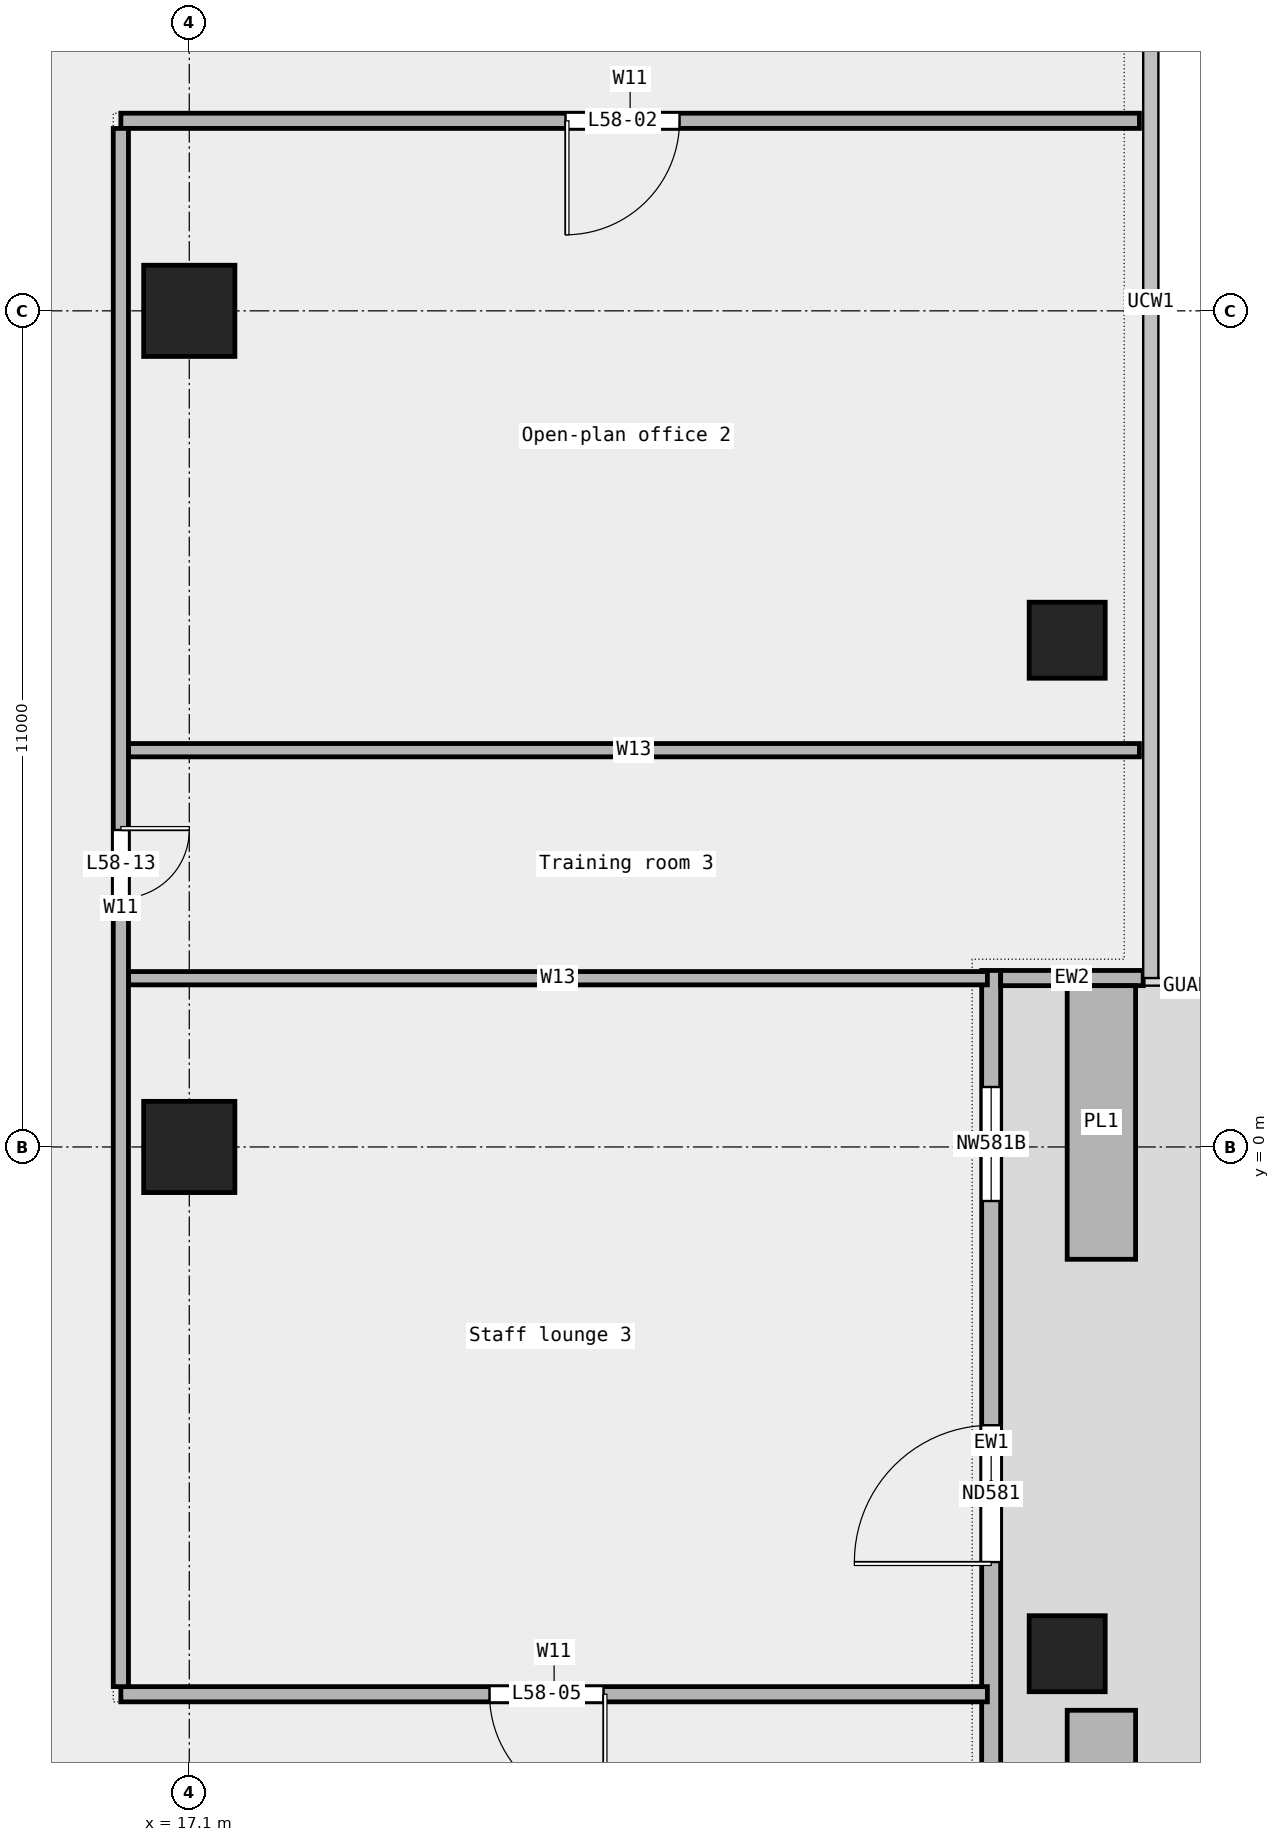
"""IFC4 building model, lengths in metres.
Left out: names, types, materials, properties, quantities, classifications, styles, units other than length and angle.
Written with IfcOpenShell. Run it as: python <this file> out.ifc"""

import sys

from ifc_helpers import new_model, si_unit, direction, frame, frame_2d, origin, origin_2d, place, context, subcontext, project, spatial, rectangle, extrude, element, fill, save


model = new_model("IFC4")
c1 = context("Model", 3, precision=1e-05, world=origin(), true_north=direction((0.0, 1.0)))
c2 = subcontext(c1, "Body", "Model", "MODEL_VIEW")
j1 = project(units=[si_unit("LENGTHUNIT", "METRE"), si_unit("PLANEANGLEUNIT", "RADIAN")], contexts=[c1])
p1 = place(None, origin())
s1 = spatial("IfcSite", under=j1, at=p1, CompositionType="ELEMENT")
p2 = place(p1, origin())
s2 = spatial("IfcBuilding", under=s1, at=p2, CompositionType="ELEMENT")
p3 = place(p2, frame((0.0, 0.0, 271.4)))
s3 = spatial("IfcBuildingStorey", under=s2, at=p3, CompositionType="ELEMENT", Elevation=271.4)
for number, where, z_axis, x_axis in (
    (1, (28.65, -6.667, 0.0), (0.0, 0.0, 1.0), (1.0, 0.0, 0.0)),
    (2, (28.65, 6.667, 0.0), (0.0, 0.0, 1.0), (1.0, 0.0, 0.0)),
):
    element("IfcColumn", number, at=place(p3, frame(where, z_axis=z_axis, x_axis=x_axis)), inside=s3, PredefinedType="COLUMN", context=c2, shape_type="SweptSolid", body=[
        extrude(rectangle(XDim=1.0, YDim=1.0, at=origin_2d()), origin(), (0.0, 0.0, 1.0), 3.6),
    ])
for number, where, z_axis, x_axis in (
    (3, (17.1, 0.0, 0.0), (0.0, 0.0, 1.0), (1.0, 0.0, 0.0)),
    (4, (17.1, 11.0, 0.0), (0.0, 0.0, 1.0), (1.0, 0.0, 0.0)),
):
    element("IfcColumn", number, at=place(p3, frame(where, z_axis=z_axis, x_axis=x_axis)), inside=s3, PredefinedType="COLUMN", context=c2, shape_type="SweptSolid", body=[
        extrude(rectangle(XDim=1.2, YDim=1.2, at=origin_2d()), origin(), (0.0, 0.0, 1.0), 3.6),
    ])
p4 = place(p3, frame((27.65, -11.211, 0.0), z_axis=(0.0, 0.0, 1.0), x_axis=(0.0, 1.0, 0.0)))
e5 = element("IfcWall", 5, at=p4, inside=s3, PredefinedType="STANDARD", context=c2, shape_type="SweptSolid", body=[
    extrude(rectangle(XDim=13.533, YDim=0.25, at=frame_2d((6.767, 0.0))), origin(), (0.0, 0.0, 1.0), 3.6),
])
p5 = place(p4, frame((1.5, 0.0, 0.45)))
e6 = element("IfcOpeningElement", 6, at=p5, cuts=e5, PredefinedType="OPENING", context=c2, shape_type="SweptSolid", body=[
    extrude(rectangle(XDim=1.5, YDim=2.4, at=frame_2d((0.75, 1.2))), frame((0.0, 0.137, 0.0), z_axis=(0.0, -1.0, 0.0), x_axis=(1.0, 0.0, 0.0)), (0.0, 0.0, 1.0), 0.274),
])
p6 = place(p4, frame((5.75, 0.0, 0.0)))
e7 = element("IfcOpeningElement", 7, at=p6, cuts=e5, PredefinedType="OPENING", context=c2, shape_type="SweptSolid", body=[
    extrude(rectangle(XDim=1.8, YDim=2.4, at=frame_2d((0.9, 1.2))), frame((0.0, 0.137, 0.0), z_axis=(0.0, -1.0, 0.0), x_axis=(1.0, 0.0, 0.0)), (0.0, 0.0, 1.0), 0.274),
])
p7 = place(p4, frame((10.5, 0.0, 0.45)))
e8 = element("IfcOpeningElement", 8, at=p7, cuts=e5, PredefinedType="OPENING", context=c2, shape_type="SweptSolid", body=[
    extrude(rectangle(XDim=1.5, YDim=2.4, at=frame_2d((0.75, 1.2))), frame((0.0, 0.137, 0.0), z_axis=(0.0, -1.0, 0.0), x_axis=(1.0, 0.0, 0.0)), (0.0, 0.0, 1.0), 0.274),
])
p8 = place(p3, frame((29.65, 2.222, 0.0), z_axis=(0.0, 0.0, 1.0), x_axis=(-1.0, 0.0, 0.0)))
e9 = element("IfcWall", 9, at=p8, inside=s3, PredefinedType="STANDARD", context=c2, shape_type="SweptSolid", body=[
    extrude(rectangle(XDim=1.875, YDim=0.2, at=frame_2d((0.938, 0.0))), origin(), (0.0, 0.0, 1.0), 3.6),
])
for number, where, z_axis, x_axis in (
    (10, (29.1, -11.011, 0.0), (0.0, 0.0, 1.0), (0.0, 1.0, 0.0)),
    (11, (29.1, -1.478, 0.0), (0.0, 0.0, 1.0), (0.0, 1.0, 0.0)),
):
    element("IfcWall", number, at=place(p3, frame(where, z_axis=z_axis, x_axis=x_axis)), inside=s3, PredefinedType="STANDARD", context=c2, shape_type="SweptSolid", body=[
        extrude(rectangle(XDim=3.6, YDim=0.9, at=frame_2d((1.8, 0.0))), origin(), (0.0, 0.0, 1.0), 0.7),
    ])
p9 = place(p3, frame((16.2, -7.2, 0.0), z_axis=(0.0, 0.0, 1.0), x_axis=(1.0, 0.0, 0.0)))
e12 = element("IfcWall", 12, at=p9, inside=s3, PredefinedType="PARTITIONING", context=c2, shape_type="SweptSolid", body=[
    extrude(rectangle(XDim=11.4, YDim=0.2, at=frame_2d((5.7, 0.0))), origin(), (0.0, 0.0, 1.0), 3.6),
])
p10 = place(p9, frame((4.85, 0.0, 0.0)))
e13 = element("IfcOpeningElement", 13, at=p10, cuts=e12, PredefinedType="OPENING", context=c2, shape_type="SweptSolid", body=[
    extrude(rectangle(XDim=1.5, YDim=2.1, at=frame_2d((0.75, 1.05))), frame((0.0, 0.112, 0.0), z_axis=(0.0, -1.0, 0.0), x_axis=(1.0, 0.0, 0.0)), (0.0, 0.0, 1.0), 0.224),
])
p11 = place(p3, frame((16.3, 2.22, 0.0), z_axis=(0.0, 0.0, 1.0), x_axis=(1.0, 0.0, 0.0)))
e14 = element("IfcWall", 14, at=p11, inside=s3, PredefinedType="PARTITIONING", context=c2, shape_type="SweptSolid", body=[
    extrude(rectangle(XDim=11.3, YDim=0.175, at=frame_2d((5.65, 0.0))), origin(), (0.0, 0.0, 1.0), 3.6),
])
p12 = place(p3, frame((16.3, 5.22, 0.0), z_axis=(0.0, 0.0, 1.0), x_axis=(1.0, 0.0, 0.0)))
e15 = element("IfcWall", 15, at=p12, inside=s3, PredefinedType="PARTITIONING", context=c2, shape_type="SweptSolid", body=[
    extrude(rectangle(XDim=13.3, YDim=0.175, at=frame_2d((6.65, 0.0))), origin(), (0.0, 0.0, 1.0), 3.6),
])
p13 = place(p3, frame((16.2, 13.5, 0.0), z_axis=(0.0, 0.0, 1.0), x_axis=(1.0, 0.0, 0.0)))
e16 = element("IfcWall", 16, at=p13, inside=s3, PredefinedType="PARTITIONING", context=c2, shape_type="SweptSolid", body=[
    extrude(rectangle(XDim=13.4, YDim=0.2, at=frame_2d((6.7, 0.0))), origin(), (0.0, 0.0, 1.0), 3.6),
])
p14 = place(p13, frame((5.85, 0.0, 0.0)))
e17 = element("IfcOpeningElement", 17, at=p14, cuts=e16, PredefinedType="OPENING", context=c2, shape_type="SweptSolid", body=[
    extrude(rectangle(XDim=1.5, YDim=2.1, at=frame_2d((0.75, 1.05))), frame((0.0, 0.112, 0.0), z_axis=(0.0, -1.0, 0.0), x_axis=(1.0, 0.0, 0.0)), (0.0, 0.0, 1.0), 0.224),
])
p15 = place(p3, frame((16.2, -7.1, 0.0), z_axis=(0.0, 0.0, 1.0), x_axis=(0.0, 1.0, 0.0)))
e18 = element("IfcWall", 18, at=p15, inside=s3, PredefinedType="PARTITIONING", context=c2, shape_type="SweptSolid", body=[
    extrude(rectangle(XDim=20.5, YDim=0.2, at=frame_2d((10.25, 0.0))), origin(), (0.0, 0.0, 1.0), 3.6),
])
p16 = place(p15, frame((10.37, 0.0, 0.0)))
e19 = element("IfcOpeningElement", 19, at=p16, cuts=e18, PredefinedType="OPENING", context=c2, shape_type="SweptSolid", body=[
    extrude(rectangle(XDim=0.9, YDim=2.1, at=frame_2d((0.45, 1.05))), frame((0.0, 0.112, 0.0), z_axis=(0.0, -1.0, 0.0), x_axis=(1.0, 0.0, 0.0)), (0.0, 0.0, 1.0), 0.224),
])
p17 = place(p6, origin())
e20 = element("IfcDoor", 20, at=p17, inside=s3, OperationType="DOUBLE_DOOR_SINGLE_SWING", PredefinedType="DOOR", context=c2, shape_type="SweptSolid", body=[
    extrude(rectangle(XDim=1.8, YDim=2.4, at=frame_2d((0.9, 1.2))), frame((0.0, 0.025, 0.0), z_axis=(0.0, -1.0, 0.0), x_axis=(1.0, 0.0, 0.0)), (0.0, 0.0, 1.0), 0.05),
])
fill(e7, e20)
p18 = place(p7, origin())
e21 = element("IfcWindow", 21, at=p18, inside=s3, PartitioningType="SINGLE_PANEL", PredefinedType="WINDOW", context=c2, shape_type="SweptSolid", body=[
    extrude(rectangle(XDim=1.5, YDim=2.4, at=frame_2d((0.75, 1.2))), frame((0.0, 0.03, 0.0), z_axis=(0.0, -1.0, 0.0), x_axis=(1.0, 0.0, 0.0)), (0.0, 0.0, 1.0), 0.06),
])
fill(e8, e21)
p19 = place(p14, origin())
e22 = element("IfcDoor", 22, at=p19, inside=s3, OperationType="DOUBLE_DOOR_SINGLE_SWING", PredefinedType="DOOR", context=c2, shape_type="SweptSolid", body=[
    extrude(rectangle(XDim=1.5, YDim=2.1, at=frame_2d((0.75, 1.05))), frame((0.0, 0.025, 0.0), z_axis=(0.0, -1.0, 0.0), x_axis=(1.0, 0.0, 0.0)), (0.0, 0.0, 1.0), 0.05),
])
fill(e17, e22)
p20 = place(p10, origin())
e23 = element("IfcDoor", 23, at=p20, inside=s3, OperationType="DOUBLE_DOOR_SINGLE_SWING", PredefinedType="DOOR", context=c2, shape_type="SweptSolid", body=[
    extrude(rectangle(XDim=1.5, YDim=2.1, at=frame_2d((0.75, 1.05))), frame((0.0, 0.025, 0.0), z_axis=(0.0, -1.0, 0.0), x_axis=(1.0, 0.0, 0.0)), (0.0, 0.0, 1.0), 0.05),
])
fill(e13, e23)
p21 = place(p16, origin())
e24 = element("IfcDoor", 24, at=p21, inside=s3, OperationType="SINGLE_SWING_LEFT", PredefinedType="DOOR", context=c2, shape_type="SweptSolid", body=[
    extrude(rectangle(XDim=0.9, YDim=2.1, at=frame_2d((0.45, 1.05))), frame((0.0, 0.025, 0.0), z_axis=(0.0, -1.0, 0.0), x_axis=(1.0, 0.0, 0.0)), (0.0, 0.0, 1.0), 0.05),
])
fill(e19, e24)
save(model, sys.argv[1])
